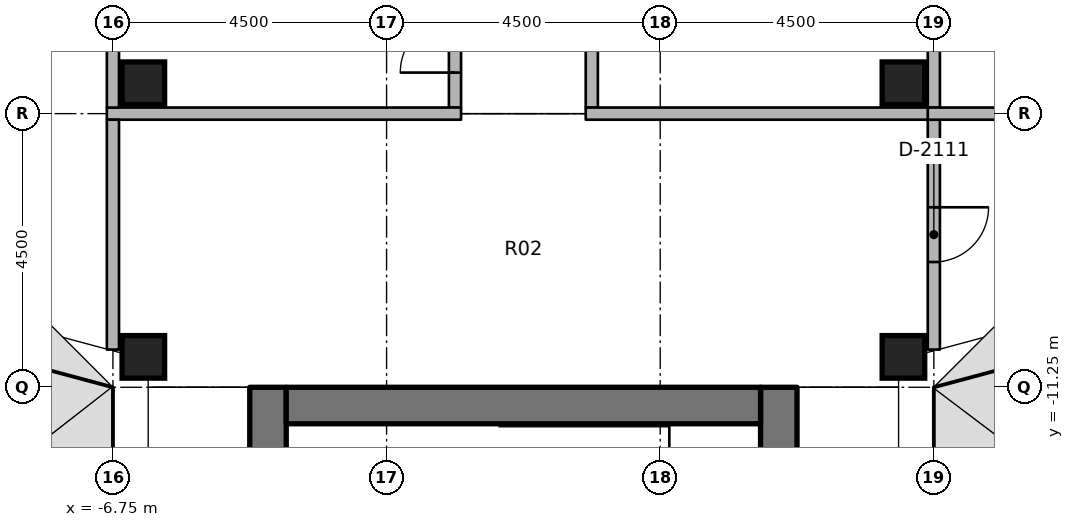
"""IFC4 building model, lengths in metres.
Left out: names, types, materials, properties, quantities, classifications, styles, units other than length and angle.
Written with IfcOpenShell. Run it as: python <this file> out.ifc"""

import sys

from ifc_helpers import new_model, si_unit, direction, frame, frame_2d, origin, origin_2d, place, context, subcontext, project, spatial, rectangle, extrude, element, fill, save


model = new_model("IFC4")
c1 = context("Model", 3, precision=1e-05, world=origin(), true_north=direction((0.0, 1.0)))
c2 = subcontext(c1, "Body", "Model", "MODEL_VIEW")
j1 = project(units=[si_unit("LENGTHUNIT", "METRE"), si_unit("PLANEANGLEUNIT", "RADIAN")], contexts=[c1])
p1 = place(None, origin())
s1 = spatial("IfcSite", under=j1, at=p1, CompositionType="ELEMENT")
p2 = place(p1, origin())
s2 = spatial("IfcBuilding", under=s1, at=p2, CompositionType="ELEMENT")
p3 = place(p2, frame((0.0, 0.0, 195.4)))
s3 = spatial("IfcBuildingStorey", under=s2, at=p3, CompositionType="ELEMENT", Elevation=195.4)
for number, where, z_axis, x_axis in (
    (1, (-6.25, -10.75, 0.0), (0.0, 0.0, 1.0), (1.0, 0.0, 0.0)),
    (2, (-6.25, -6.25, 0.0), (0.0, 0.0, 1.0), (1.0, 0.0, 0.0)),
    (3, (6.25, -10.75, 0.0), (0.0, 0.0, 1.0), (1.0, 0.0, 0.0)),
    (4, (6.25, -6.25, 0.0), (0.0, 0.0, 1.0), (1.0, 0.0, 0.0)),
):
    element("IfcColumn", number, at=place(p3, frame(where, z_axis=z_axis, x_axis=x_axis)), inside=s3, PredefinedType="COLUMN", context=c2, shape_type="SweptSolid", body=[
        extrude(rectangle(XDim=0.7, YDim=0.7, at=origin_2d()), origin(), (0.0, 0.0, 1.0), 3.65),
    ])
p4 = place(p3, frame((-4.2, -11.25, 0.0), z_axis=(0.0, 0.0, 1.0), x_axis=(0.0, -1.0, 0.0)))
e5 = element("IfcWall", 5, at=p4, inside=s3, PredefinedType="SHEAR", context=c2, shape_type="SweptSolid", body=[
    extrude(rectangle(XDim=15.0, YDim=0.6, at=frame_2d((7.5, 0.0))), origin(), (0.0, 0.0, 1.0), 3.8),
])
p5 = place(p4, frame((7.15, 0.0, 0.0)))
e6 = element("IfcOpeningElement", 6, at=p5, cuts=e5, PredefinedType="OPENING", context=c2, shape_type="SweptSolid", body=[
    extrude(rectangle(XDim=1.5, YDim=2.3, at=frame_2d((0.75, 1.15))), frame((0.0, 0.31, 0.0), z_axis=(0.0, -1.0, 0.0), x_axis=(1.0, 0.0, 0.0)), (0.0, 0.0, 1.0), 0.62),
])
p6 = place(p4, frame((5.55, 0.0, 0.0)))
e7 = element("IfcOpeningElement", 7, at=p6, cuts=e5, PredefinedType="OPENING", context=c2, shape_type="SweptSolid", body=[
    extrude(rectangle(XDim=1.2, YDim=2.1, at=frame_2d((0.6, 1.05))), frame((0.0, 0.31, 0.0), z_axis=(0.0, -1.0, 0.0), x_axis=(1.0, 0.0, 0.0)), (0.0, 0.0, 1.0), 0.62),
])
p7 = place(p3, frame((4.2, -11.25, 0.0), z_axis=(0.0, 0.0, 1.0), x_axis=(0.0, -1.0, 0.0)))
e8 = element("IfcWall", 8, at=p7, inside=s3, PredefinedType="SHEAR", context=c2, shape_type="SweptSolid", body=[
    extrude(rectangle(XDim=15.0, YDim=0.6, at=frame_2d((7.5, 0.0))), origin(), (0.0, 0.0, 1.0), 3.8),
])
p8 = place(p7, frame((7.15, 0.0, 0.0)))
e9 = element("IfcOpeningElement", 9, at=p8, cuts=e8, PredefinedType="OPENING", context=c2, shape_type="SweptSolid", body=[
    extrude(rectangle(XDim=1.5, YDim=2.3, at=frame_2d((0.75, 1.15))), frame((0.0, 0.31, 0.0), z_axis=(0.0, -1.0, 0.0), x_axis=(1.0, 0.0, 0.0)), (0.0, 0.0, 1.0), 0.62),
])
p9 = place(p7, frame((13.9, 0.0, 0.0)))
e10 = element("IfcOpeningElement", 10, at=p9, cuts=e8, PredefinedType="OPENING", context=c2, shape_type="SweptSolid", body=[
    extrude(rectangle(XDim=0.9, YDim=2.1, at=frame_2d((0.45, 1.05))), frame((0.0, 0.31, 0.0), z_axis=(0.0, -1.0, 0.0), x_axis=(1.0, 0.0, 0.0)), (0.0, 0.0, 1.0), 0.62),
])
p10 = place(p7, frame((1.15, 0.0, 0.0)))
e11 = element("IfcOpeningElement", 11, at=p10, cuts=e8, PredefinedType="OPENING", context=c2, shape_type="SweptSolid", body=[
    extrude(rectangle(XDim=1.2, YDim=2.1, at=frame_2d((0.6, 1.05))), frame((0.0, 0.31, 0.0), z_axis=(0.0, -1.0, 0.0), x_axis=(1.0, 0.0, 0.0)), (0.0, 0.0, 1.0), 0.62),
])
p11 = place(p3, frame((-3.9, -11.55, 0.0), z_axis=(0.0, 0.0, 1.0), x_axis=(1.0, 0.0, 0.0)))
e12 = element("IfcWall", 12, at=p11, inside=s3, PredefinedType="SHEAR", context=c2, shape_type="SweptSolid", body=[
    extrude(rectangle(XDim=7.8, YDim=0.6, at=frame_2d((3.9, 0.0))), origin(), (0.0, 0.0, 1.0), 3.8),
])
p12 = place(p3, frame((1.125, -6.65, 0.0), z_axis=(0.0, 0.0, 1.0), x_axis=(0.0, 1.0, 0.0)))
e13 = element("IfcWall", 13, at=p12, inside=s3, PredefinedType="PARTITIONING", context=c2, shape_type="SweptSolid", body=[
    extrude(rectangle(XDim=4.3, YDim=0.2, at=frame_2d((2.15, 0.0))), origin(), (0.0, 0.0, 1.0), 2.75),
])
p13 = place(p3, frame((-1.125, -6.65, 0.0), z_axis=(0.0, 0.0, 1.0), x_axis=(0.0, 1.0, 0.0)))
e14 = element("IfcWall", 14, at=p13, inside=s3, PredefinedType="PARTITIONING", context=c2, shape_type="SweptSolid", body=[
    extrude(rectangle(XDim=2.05, YDim=0.2, at=frame_2d((1.025, 0.0))), origin(), (0.0, 0.0, 1.0), 2.75),
])
p14 = place(p13, frame((0.575, 0.0, 0.0)))
e15 = element("IfcOpeningElement", 15, at=p14, cuts=e14, PredefinedType="OPENING", context=c2, shape_type="SweptSolid", body=[
    extrude(rectangle(XDim=0.9, YDim=2.1, at=frame_2d((0.45, 1.05))), frame((0.0, 0.11, 0.0), z_axis=(0.0, -1.0, 0.0), x_axis=(1.0, 0.0, 0.0)), (0.0, 0.0, 1.0), 0.22),
])
p15 = place(p3, frame((1.025, -6.75, 0.0), z_axis=(0.0, 0.0, 1.0), x_axis=(1.0, 0.0, 0.0)))
e16 = element("IfcWall", 16, at=p15, inside=s3, PredefinedType="PARTITIONING", context=c2, shape_type="SweptSolid", body=[
    extrude(rectangle(XDim=5.825, YDim=0.2, at=frame_2d((2.913, 0.0))), origin(), (0.0, 0.0, 1.0), 2.75),
])
p16 = place(p3, frame((6.75, -6.85, 0.0), z_axis=(0.0, 0.0, 1.0), x_axis=(0.0, -1.0, 0.0)))
e17 = element("IfcWall", 17, at=p16, inside=s3, PredefinedType="PARTITIONING", context=c2, shape_type="SweptSolid", body=[
    extrude(rectangle(XDim=3.78, YDim=0.2, at=frame_2d((1.89, 0.0))), origin(), (0.0, 0.0, 1.0), 2.75),
])
p17 = place(p16, frame((1.44, 0.0, 0.0)))
e18 = element("IfcOpeningElement", 18, at=p17, cuts=e17, PredefinedType="OPENING", context=c2, shape_type="SweptSolid", body=[
    extrude(rectangle(XDim=0.9, YDim=2.1, at=frame_2d((0.45, 1.05))), frame((0.0, 0.11, 0.0), z_axis=(0.0, -1.0, 0.0), x_axis=(1.0, 0.0, 0.0)), (0.0, 0.0, 1.0), 0.22),
])
p18 = place(p3, frame((-6.85, -6.75, 0.0), z_axis=(0.0, 0.0, 1.0), x_axis=(1.0, 0.0, 0.0)))
e19 = element("IfcWall", 19, at=p18, inside=s3, PredefinedType="PARTITIONING", context=c2, shape_type="SweptSolid", body=[
    extrude(rectangle(XDim=5.825, YDim=0.2, at=frame_2d((2.913, 0.0))), origin(), (0.0, 0.0, 1.0), 2.75),
])
p19 = place(p3, frame((-6.75, -10.63, 0.0), z_axis=(0.0, 0.0, 1.0), x_axis=(0.0, 1.0, 0.0)))
e20 = element("IfcWall", 20, at=p19, inside=s3, PredefinedType="PARTITIONING", context=c2, shape_type="SweptSolid", body=[
    extrude(rectangle(XDim=3.78, YDim=0.2, at=frame_2d((1.89, 0.0))), origin(), (0.0, 0.0, 1.0), 2.75),
])
p20 = place(p3, frame((6.75, -6.65, 0.0), z_axis=(0.0, 0.0, 1.0), x_axis=(0.0, 1.0, 0.0)))
e21 = element("IfcWall", 21, at=p20, inside=s3, PredefinedType="PARTITIONING", context=c2, shape_type="SweptSolid", body=[
    extrude(rectangle(XDim=4.3, YDim=0.2, at=frame_2d((2.15, 0.0))), origin(), (0.0, 0.0, 1.0), 2.75),
])
p21 = place(p3, frame((6.65, -6.75, 0.0), z_axis=(0.0, 0.0, 1.0), x_axis=(1.0, 0.0, 0.0)))
e22 = element("IfcWall", 22, at=p21, inside=s3, PredefinedType="PARTITIONING", context=c2, shape_type="SweptSolid", body=[
    extrude(rectangle(XDim=4.7, YDim=0.2, at=frame_2d((2.35, 0.0))), origin(), (0.0, 0.0, 1.0), 2.75),
])
p22 = place(p3, frame((-6.75, -6.65, 0.0), z_axis=(0.0, 0.0, 1.0), x_axis=(0.0, 1.0, 0.0)))
e23 = element("IfcWall", 23, at=p22, inside=s3, PredefinedType="PARTITIONING", context=c2, shape_type="SweptSolid", body=[
    extrude(rectangle(XDim=2.05, YDim=0.2, at=frame_2d((1.025, 0.0))), origin(), (0.0, 0.0, 1.0), 2.75),
])
p23 = place(p17, origin())
e24 = element("IfcDoor", 24, at=p23, inside=s3, OperationType="SINGLE_SWING_LEFT", PredefinedType="DOOR", context=c2, shape_type="SweptSolid", body=[
    extrude(rectangle(XDim=0.9, YDim=2.1, at=frame_2d((0.45, 1.05))), frame((0.0, 0.025, 0.0), z_axis=(0.0, -1.0, 0.0), x_axis=(1.0, 0.0, 0.0)), (0.0, 0.0, 1.0), 0.05),
])
fill(e18, e24)
p24 = place(p14, origin())
e25 = element("IfcDoor", 25, at=p24, inside=s3, OperationType="SINGLE_SWING_RIGHT", PredefinedType="DOOR", context=c2, shape_type="SweptSolid", body=[
    extrude(rectangle(XDim=0.9, YDim=2.1, at=frame_2d((0.45, 1.05))), frame((0.0, 0.025, 0.0), z_axis=(0.0, -1.0, 0.0), x_axis=(1.0, 0.0, 0.0)), (0.0, 0.0, 1.0), 0.05),
])
fill(e15, e25)
save(model, sys.argv[1])
